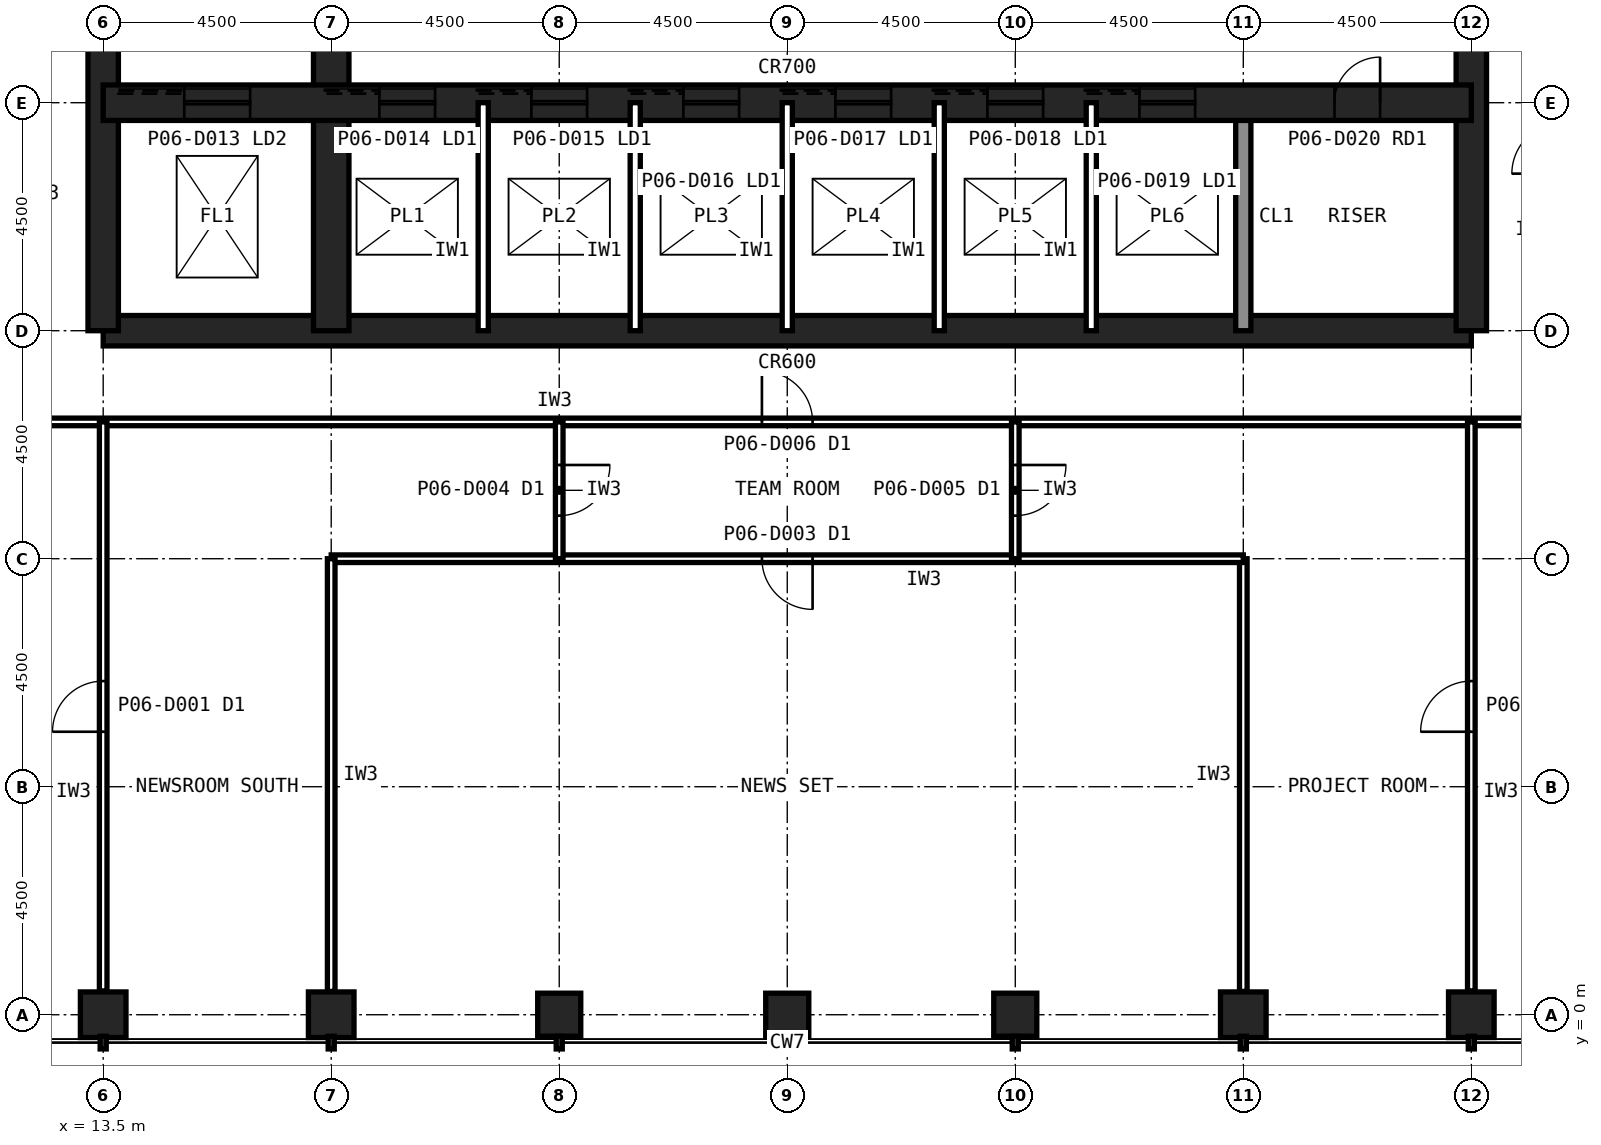
"""IFC4 building model, lengths in metres.
Left out: names, types, materials, properties, quantities, classifications, styles, units other than length and angle.
Written with IfcOpenShell. Run it as: python <this file> out.ifc"""

import sys

from ifc_helpers import new_model, si_unit, direction, frame, frame_2d, origin, origin_2d, place, context, subcontext, project, spatial, rectangle, hollow_rectangle, extrude, element, fill, save


model = new_model("IFC4")
c1 = context("Model", 3, precision=1e-05, world=origin(), true_north=direction((0.0, 1.0)))
c2 = subcontext(c1, "Body", "Model", "MODEL_VIEW")
j1 = project(units=[si_unit("LENGTHUNIT", "METRE"), si_unit("PLANEANGLEUNIT", "RADIAN")], contexts=[c1])
p1 = place(None, origin())
s1 = spatial("IfcSite", under=j1, at=p1, CompositionType="ELEMENT")
p2 = place(p1, origin())
s2 = spatial("IfcBuilding", under=s1, at=p2, CompositionType="ELEMENT")
p3 = place(p2, frame((0.0, 0.0, 29.0)))
s3 = spatial("IfcBuildingStorey", under=s2, at=p3, CompositionType="ELEMENT", Elevation=29.0)
for number, where, z_axis, x_axis in (
    (1, (13.5, 0.0, 0.0), (0.0, 0.0, 1.0), (1.0, 0.0, 0.0)),
    (2, (18.0, 0.0, 0.0), (0.0, 0.0, 1.0), (1.0, 0.0, 0.0)),
):
    element("IfcColumn", number, at=place(p3, frame(where, z_axis=z_axis, x_axis=x_axis)), inside=s3, PredefinedType="COLUMN", context=c2, shape_type="SweptSolid", body=[
        extrude(hollow_rectangle(XDim=0.9, YDim=0.9, WallThickness=0.063, at=origin_2d()), origin(), (0.0, 0.0, 1.0), 4.2),
    ])
for number, where, z_axis, x_axis in (
    (3, (22.5, 0.0, 0.0), (0.0, 0.0, 1.0), (1.0, 0.0, 0.0)),
    (4, (27.0, 0.0, 0.0), (0.0, 0.0, 1.0), (1.0, 0.0, 0.0)),
    (5, (31.5, 0.0, 0.0), (0.0, 0.0, 1.0), (1.0, 0.0, 0.0)),
):
    element("IfcColumn", number, at=place(p3, frame(where, z_axis=z_axis, x_axis=x_axis)), inside=s3, PredefinedType="COLUMN", context=c2, shape_type="SweptSolid", body=[
        extrude(hollow_rectangle(XDim=0.85, YDim=0.85, WallThickness=0.05, at=origin_2d()), origin(), (0.0, 0.0, 1.0), 4.2),
    ])
for number, where, z_axis, x_axis in (
    (6, (36.0, 0.0, 0.0), (0.0, 0.0, 1.0), (1.0, 0.0, 0.0)),
    (7, (40.5, 0.0, 0.0), (0.0, 0.0, 1.0), (1.0, 0.0, 0.0)),
):
    element("IfcColumn", number, at=place(p3, frame(where, z_axis=z_axis, x_axis=x_axis)), inside=s3, PredefinedType="COLUMN", context=c2, shape_type="SweptSolid", body=[
        extrude(hollow_rectangle(XDim=0.9, YDim=0.9, WallThickness=0.063, at=origin_2d()), origin(), (0.0, 0.0, 1.0), 4.2),
    ])
p4 = place(p3, frame((13.5, 13.5, 0.0), z_axis=(0.0, 0.0, 1.0), x_axis=(1.0, 0.0, 0.0)))
e8 = element("IfcWall", 8, at=p4, inside=s3, PredefinedType="SHEAR", context=c2, shape_type="SweptSolid", body=[
    extrude(rectangle(XDim=27.0, YDim=0.6, at=frame_2d((13.5, 0.0))), origin(), (0.0, 0.0, 1.0), 4.2),
])
p5 = place(p3, frame((40.5, 13.5, 0.0), z_axis=(0.0, 0.0, 1.0), x_axis=(0.0, 1.0, 0.0)))
e9 = element("IfcWall", 9, at=p5, inside=s3, PredefinedType="SHEAR", context=c2, shape_type="SweptSolid", body=[
    extrude(rectangle(XDim=27.0, YDim=0.6, at=frame_2d((13.5, 0.0))), origin(), (0.0, 0.0, 1.0), 4.2),
])
p6 = place(p5, frame((5.85, 0.0, 0.0)))
e10 = element("IfcOpeningElement", 10, at=p6, cuts=e9, PredefinedType="OPENING", context=c2, shape_type="SweptSolid", body=[
    extrude(rectangle(XDim=1.8, YDim=2.1, at=frame_2d((0.9, 1.05))), frame((0.0, 0.31, 0.0), z_axis=(0.0, -1.0, 0.0), x_axis=(1.0, 0.0, 0.0)), (0.0, 0.0, 1.0), 0.62),
])
p7 = place(p5, frame((19.65, 0.0, 0.0)))
e11 = element("IfcOpeningElement", 11, at=p7, cuts=e9, PredefinedType="OPENING", context=c2, shape_type="SweptSolid", body=[
    extrude(rectangle(XDim=1.2, YDim=2.1, at=frame_2d((0.6, 1.05))), frame((0.0, 0.31, 0.0), z_axis=(0.0, -1.0, 0.0), x_axis=(1.0, 0.0, 0.0)), (0.0, 0.0, 1.0), 0.62),
])
p8 = place(p3, frame((13.5, 40.5, 0.0), z_axis=(0.0, 0.0, 1.0), x_axis=(0.0, -1.0, 0.0)))
e12 = element("IfcWall", 12, at=p8, inside=s3, PredefinedType="SHEAR", context=c2, shape_type="SweptSolid", body=[
    extrude(rectangle(XDim=27.0, YDim=0.6, at=frame_2d((13.5, 0.0))), origin(), (0.0, 0.0, 1.0), 4.2),
])
p9 = place(p8, frame((19.65, 0.0, 0.0)))
e13 = element("IfcOpeningElement", 13, at=p9, cuts=e12, PredefinedType="OPENING", context=c2, shape_type="SweptSolid", body=[
    extrude(rectangle(XDim=1.2, YDim=2.1, at=frame_2d((0.6, 1.05))), frame((0.0, 0.31, 0.0), z_axis=(0.0, -1.0, 0.0), x_axis=(1.0, 0.0, 0.0)), (0.0, 0.0, 1.0), 0.62),
])
p10 = place(p8, frame((5.85, 0.0, 0.0)))
e14 = element("IfcOpeningElement", 14, at=p10, cuts=e12, PredefinedType="OPENING", context=c2, shape_type="SweptSolid", body=[
    extrude(rectangle(XDim=1.8, YDim=2.1, at=frame_2d((0.9, 1.05))), frame((0.0, 0.31, 0.0), z_axis=(0.0, -1.0, 0.0), x_axis=(1.0, 0.0, 0.0)), (0.0, 0.0, 1.0), 0.62),
])
p11 = place(p3, frame((18.0, 13.5, 0.0), z_axis=(0.0, 0.0, 1.0), x_axis=(0.0, 1.0, 0.0)))
e15 = element("IfcWall", 15, at=p11, inside=s3, PredefinedType="SHEAR", context=c2, shape_type="SweptSolid", body=[
    extrude(rectangle(XDim=18.0, YDim=0.7, at=frame_2d((9.0, 0.0))), origin(), (0.0, 0.0, 1.0), 4.2),
])
p12 = place(p3, frame((36.0, 13.5, 0.0), z_axis=(0.0, 0.0, 1.0), x_axis=(0.0, 1.0, 0.0)))
e16 = element("IfcWall", 16, at=p12, inside=s3, PredefinedType="SOLIDWALL", context=c2, shape_type="SweptSolid", body=[
    extrude(rectangle(XDim=4.5, YDim=0.3, at=frame_2d((2.25, 0.0))), origin(), (0.0, 0.0, 1.0), 4.04),
])
p13 = place(p3, frame((13.5, 18.0, 0.0), z_axis=(0.0, 0.0, 1.0), x_axis=(1.0, 0.0, 0.0)))
e17 = element("IfcWall", 17, at=p13, inside=s3, PredefinedType="SHEAR", context=c2, shape_type="SweptSolid", body=[
    extrude(rectangle(XDim=27.0, YDim=0.7, at=frame_2d((13.5, 0.0))), origin(), (0.0, 0.0, 1.0), 4.2),
])
p14 = place(p13, frame((24.3, 0.0, 0.0)))
e18 = element("IfcOpeningElement", 18, at=p14, cuts=e17, PredefinedType="OPENING", context=c2, shape_type="SweptSolid", body=[
    extrude(rectangle(XDim=0.9, YDim=2.1, at=frame_2d((0.45, 1.05))), frame((0.0, 0.36, 0.0), z_axis=(0.0, -1.0, 0.0), x_axis=(1.0, 0.0, 0.0)), (0.0, 0.0, 1.0), 0.72),
])
p15 = place(p13, frame((5.45, 0.0, 0.0)))
e19 = element("IfcOpeningElement", 19, at=p15, cuts=e17, PredefinedType="OPENING", context=c2, shape_type="SweptSolid", body=[
    extrude(rectangle(XDim=1.1, YDim=2.1, at=frame_2d((0.55, 1.05))), frame((0.0, 0.36, 0.0), z_axis=(0.0, -1.0, 0.0), x_axis=(1.0, 0.0, 0.0)), (0.0, 0.0, 1.0), 0.72),
])
p16 = place(p13, frame((8.45, 0.0, 0.0)))
e20 = element("IfcOpeningElement", 20, at=p16, cuts=e17, PredefinedType="OPENING", context=c2, shape_type="SweptSolid", body=[
    extrude(rectangle(XDim=1.1, YDim=2.1, at=frame_2d((0.55, 1.05))), frame((0.0, 0.36, 0.0), z_axis=(0.0, -1.0, 0.0), x_axis=(1.0, 0.0, 0.0)), (0.0, 0.0, 1.0), 0.72),
])
p17 = place(p13, frame((11.45, 0.0, 0.0)))
e21 = element("IfcOpeningElement", 21, at=p17, cuts=e17, PredefinedType="OPENING", context=c2, shape_type="SweptSolid", body=[
    extrude(rectangle(XDim=1.1, YDim=2.1, at=frame_2d((0.55, 1.05))), frame((0.0, 0.36, 0.0), z_axis=(0.0, -1.0, 0.0), x_axis=(1.0, 0.0, 0.0)), (0.0, 0.0, 1.0), 0.72),
])
p18 = place(p13, frame((14.45, 0.0, 0.0)))
e22 = element("IfcOpeningElement", 22, at=p18, cuts=e17, PredefinedType="OPENING", context=c2, shape_type="SweptSolid", body=[
    extrude(rectangle(XDim=1.1, YDim=2.1, at=frame_2d((0.55, 1.05))), frame((0.0, 0.36, 0.0), z_axis=(0.0, -1.0, 0.0), x_axis=(1.0, 0.0, 0.0)), (0.0, 0.0, 1.0), 0.72),
])
p19 = place(p13, frame((17.45, 0.0, 0.0)))
e23 = element("IfcOpeningElement", 23, at=p19, cuts=e17, PredefinedType="OPENING", context=c2, shape_type="SweptSolid", body=[
    extrude(rectangle(XDim=1.1, YDim=2.1, at=frame_2d((0.55, 1.05))), frame((0.0, 0.36, 0.0), z_axis=(0.0, -1.0, 0.0), x_axis=(1.0, 0.0, 0.0)), (0.0, 0.0, 1.0), 0.72),
])
p20 = place(p13, frame((20.45, 0.0, 0.0)))
e24 = element("IfcOpeningElement", 24, at=p20, cuts=e17, PredefinedType="OPENING", context=c2, shape_type="SweptSolid", body=[
    extrude(rectangle(XDim=1.1, YDim=2.1, at=frame_2d((0.55, 1.05))), frame((0.0, 0.36, 0.0), z_axis=(0.0, -1.0, 0.0), x_axis=(1.0, 0.0, 0.0)), (0.0, 0.0, 1.0), 0.72),
])
p21 = place(p13, frame((1.6, 0.0, 0.0)))
e25 = element("IfcOpeningElement", 25, at=p21, cuts=e17, PredefinedType="OPENING", context=c2, shape_type="SweptSolid", body=[
    extrude(rectangle(XDim=1.3, YDim=2.2, at=frame_2d((0.65, 1.1))), frame((0.0, 0.36, 0.0), z_axis=(0.0, -1.0, 0.0), x_axis=(1.0, 0.0, 0.0)), (0.0, 0.0, 1.0), 0.72),
])
for number, where, z_axis, x_axis in (
    (26, (21.0, 13.5, 0.0), (0.0, 0.0, 1.0), (0.0, 1.0, 0.0)),
    (27, (24.0, 13.5, 0.0), (0.0, 0.0, 1.0), (0.0, 1.0, 0.0)),
    (28, (27.0, 13.5, 0.0), (0.0, 0.0, 1.0), (0.0, 1.0, 0.0)),
    (29, (30.0, 13.5, 0.0), (0.0, 0.0, 1.0), (0.0, 1.0, 0.0)),
    (30, (33.0, 13.5, 0.0), (0.0, 0.0, 1.0), (0.0, 1.0, 0.0)),
):
    element("IfcWall", number, at=place(p3, frame(where, z_axis=z_axis, x_axis=x_axis)), inside=s3, PredefinedType="PARTITIONING", context=c2, shape_type="SweptSolid", body=[
        extrude(rectangle(XDim=4.5, YDim=0.2, at=frame_2d((2.25, 0.0))), origin(), (0.0, 0.0, 1.0), 4.04),
    ])
p22 = place(p3, frame((11.7, 11.7, 0.0), z_axis=(0.0, 0.0, 1.0), x_axis=(1.0, 0.0, 0.0)))
e31 = element("IfcWall", 31, at=p22, inside=s3, PredefinedType="PARTITIONING", context=c2, shape_type="SweptSolid", body=[
    extrude(rectangle(XDim=30.6, YDim=0.15, at=frame_2d((15.3, 0.0))), origin(), (0.0, 0.0, 1.0), 4.04),
])
p23 = place(p22, frame((14.8, 0.0, 0.0)))
e32 = element("IfcOpeningElement", 32, at=p23, cuts=e31, PredefinedType="OPENING", context=c2, shape_type="SweptSolid", body=[
    extrude(rectangle(XDim=1.0, YDim=2.1, at=frame_2d((0.5, 1.05))), frame((0.0, 0.085, 0.0), z_axis=(0.0, -1.0, 0.0), x_axis=(1.0, 0.0, 0.0)), (0.0, 0.0, 1.0), 0.17),
])
p24 = place(p3, frame((36.0, 0.46, 0.0), z_axis=(0.0, 0.0, 1.0), x_axis=(0.0, 1.0, 0.0)))
e33 = element("IfcWall", 33, at=p24, inside=s3, PredefinedType="PARTITIONING", context=c2, shape_type="SweptSolid", body=[
    extrude(rectangle(XDim=8.54, YDim=0.15, at=frame_2d((4.27, 0.0))), origin(), (0.0, 0.0, 1.0), 3.189),
])
p25 = place(p3, frame((36.0, 9.0, 0.0), z_axis=(0.0, 0.0, 1.0), x_axis=(-1.0, 0.0, 0.0)))
e34 = element("IfcWall", 34, at=p25, inside=s3, PredefinedType="PARTITIONING", context=c2, shape_type="SweptSolid", body=[
    extrude(rectangle(XDim=18.0, YDim=0.15, at=frame_2d((9.0, 0.0))), origin(), (0.0, 0.0, 1.0), 4.04),
])
p26 = place(p25, frame((8.5, 0.0, 0.0)))
e35 = element("IfcOpeningElement", 35, at=p26, cuts=e34, PredefinedType="OPENING", context=c2, shape_type="SweptSolid", body=[
    extrude(rectangle(XDim=1.0, YDim=2.1, at=frame_2d((0.5, 1.05))), frame((0.0, 0.085, 0.0), z_axis=(0.0, -1.0, 0.0), x_axis=(1.0, 0.0, 0.0)), (0.0, 0.0, 1.0), 0.17),
])
p27 = place(p3, frame((18.0, 9.0, 0.0), z_axis=(0.0, 0.0, 1.0), x_axis=(0.0, -1.0, 0.0)))
e36 = element("IfcWall", 36, at=p27, inside=s3, PredefinedType="PARTITIONING", context=c2, shape_type="SweptSolid", body=[
    extrude(rectangle(XDim=8.54, YDim=0.15, at=frame_2d((4.27, 0.0))), origin(), (0.0, 0.0, 1.0), 3.189),
])
p28 = place(p3, frame((40.5, 0.47, 0.0), z_axis=(0.0, 0.0, 1.0), x_axis=(0.0, 1.0, 0.0)))
e37 = element("IfcWall", 37, at=p28, inside=s3, PredefinedType="PARTITIONING", context=c2, shape_type="SweptSolid", body=[
    extrude(rectangle(XDim=11.23, YDim=0.15, at=frame_2d((5.615, 0.0))), origin(), (0.0, 0.0, 1.0), 3.189),
])
p29 = place(p28, frame((5.115, 0.0, 0.0)))
e38 = element("IfcOpeningElement", 38, at=p29, cuts=e37, PredefinedType="OPENING", context=c2, shape_type="SweptSolid", body=[
    extrude(rectangle(XDim=1.0, YDim=2.1, at=frame_2d((0.5, 1.05))), frame((0.0, 0.085, 0.0), z_axis=(0.0, -1.0, 0.0), x_axis=(1.0, 0.0, 0.0)), (0.0, 0.0, 1.0), 0.17),
])
p30 = place(p3, frame((13.5, 0.47, 0.0), z_axis=(0.0, 0.0, 1.0), x_axis=(0.0, 1.0, 0.0)))
e39 = element("IfcWall", 39, at=p30, inside=s3, PredefinedType="PARTITIONING", context=c2, shape_type="SweptSolid", body=[
    extrude(rectangle(XDim=11.23, YDim=0.15, at=frame_2d((5.615, 0.0))), origin(), (0.0, 0.0, 1.0), 3.189),
])
p31 = place(p30, frame((5.115, 0.0, 0.0)))
e40 = element("IfcOpeningElement", 40, at=p31, cuts=e39, PredefinedType="OPENING", context=c2, shape_type="SweptSolid", body=[
    extrude(rectangle(XDim=1.0, YDim=2.1, at=frame_2d((0.5, 1.05))), frame((0.0, 0.085, 0.0), z_axis=(0.0, -1.0, 0.0), x_axis=(1.0, 0.0, 0.0)), (0.0, 0.0, 1.0), 0.17),
])
p32 = place(p3, frame((22.5, 11.7, 0.0), z_axis=(0.0, 0.0, 1.0), x_axis=(0.0, -1.0, 0.0)))
e41 = element("IfcWall", 41, at=p32, inside=s3, PredefinedType="PARTITIONING", context=c2, shape_type="SweptSolid", body=[
    extrude(rectangle(XDim=2.7, YDim=0.15, at=frame_2d((1.35, 0.0))), origin(), (0.0, 0.0, 1.0), 3.189),
])
p33 = place(p32, frame((0.85, 0.0, 0.0)))
e42 = element("IfcOpeningElement", 42, at=p33, cuts=e41, PredefinedType="OPENING", context=c2, shape_type="SweptSolid", body=[
    extrude(rectangle(XDim=1.0, YDim=2.1, at=frame_2d((0.5, 1.05))), frame((0.0, 0.085, 0.0), z_axis=(0.0, -1.0, 0.0), x_axis=(1.0, 0.0, 0.0)), (0.0, 0.0, 1.0), 0.17),
])
p34 = place(p3, frame((31.5, 11.7, 0.0), z_axis=(0.0, 0.0, 1.0), x_axis=(0.0, -1.0, 0.0)))
e43 = element("IfcWall", 43, at=p34, inside=s3, PredefinedType="PARTITIONING", context=c2, shape_type="SweptSolid", body=[
    extrude(rectangle(XDim=2.7, YDim=0.15, at=frame_2d((1.35, 0.0))), origin(), (0.0, 0.0, 1.0), 3.189),
])
p35 = place(p34, frame((0.85, 0.0, 0.0)))
e44 = element("IfcOpeningElement", 44, at=p35, cuts=e43, PredefinedType="OPENING", context=c2, shape_type="SweptSolid", body=[
    extrude(rectangle(XDim=1.0, YDim=2.1, at=frame_2d((0.5, 1.05))), frame((0.0, 0.085, 0.0), z_axis=(0.0, -1.0, 0.0), x_axis=(1.0, 0.0, 0.0)), (0.0, 0.0, 1.0), 0.17),
])
p36 = place(p14, origin())
e45 = element("IfcDoor", 45, at=p36, inside=s3, OperationType="SINGLE_SWING_RIGHT", PredefinedType="DOOR", context=c2, shape_type="SweptSolid", body=[
    extrude(rectangle(XDim=0.9, YDim=2.1, at=frame_2d((0.45, 1.05))), frame((0.0, 0.025, 0.0), z_axis=(0.0, -1.0, 0.0), x_axis=(1.0, 0.0, 0.0)), (0.0, 0.0, 1.0), 0.05),
])
fill(e18, e45)
p37 = place(p15, origin())
e46 = element("IfcDoor", 46, at=p37, inside=s3, OperationType="SLIDING_TO_LEFT", PredefinedType="DOOR", context=c2, shape_type="SweptSolid", body=[
    extrude(rectangle(XDim=1.1, YDim=2.1, at=frame_2d((0.55, 1.05))), frame((0.0, 0.025, 0.0), z_axis=(0.0, -1.0, 0.0), x_axis=(1.0, 0.0, 0.0)), (0.0, 0.0, 1.0), 0.05),
])
fill(e19, e46)
p38 = place(p16, origin())
e47 = element("IfcDoor", 47, at=p38, inside=s3, OperationType="SLIDING_TO_LEFT", PredefinedType="DOOR", context=c2, shape_type="SweptSolid", body=[
    extrude(rectangle(XDim=1.1, YDim=2.1, at=frame_2d((0.55, 1.05))), frame((0.0, 0.025, 0.0), z_axis=(0.0, -1.0, 0.0), x_axis=(1.0, 0.0, 0.0)), (0.0, 0.0, 1.0), 0.05),
])
fill(e20, e47)
p39 = place(p17, origin())
e48 = element("IfcDoor", 48, at=p39, inside=s3, OperationType="SLIDING_TO_LEFT", PredefinedType="DOOR", context=c2, shape_type="SweptSolid", body=[
    extrude(rectangle(XDim=1.1, YDim=2.1, at=frame_2d((0.55, 1.05))), frame((0.0, 0.025, 0.0), z_axis=(0.0, -1.0, 0.0), x_axis=(1.0, 0.0, 0.0)), (0.0, 0.0, 1.0), 0.05),
])
fill(e21, e48)
p40 = place(p18, origin())
e49 = element("IfcDoor", 49, at=p40, inside=s3, OperationType="SLIDING_TO_LEFT", PredefinedType="DOOR", context=c2, shape_type="SweptSolid", body=[
    extrude(rectangle(XDim=1.1, YDim=2.1, at=frame_2d((0.55, 1.05))), frame((0.0, 0.025, 0.0), z_axis=(0.0, -1.0, 0.0), x_axis=(1.0, 0.0, 0.0)), (0.0, 0.0, 1.0), 0.05),
])
fill(e22, e49)
p41 = place(p19, origin())
e50 = element("IfcDoor", 50, at=p41, inside=s3, OperationType="SLIDING_TO_LEFT", PredefinedType="DOOR", context=c2, shape_type="SweptSolid", body=[
    extrude(rectangle(XDim=1.1, YDim=2.1, at=frame_2d((0.55, 1.05))), frame((0.0, 0.025, 0.0), z_axis=(0.0, -1.0, 0.0), x_axis=(1.0, 0.0, 0.0)), (0.0, 0.0, 1.0), 0.05),
])
fill(e23, e50)
p42 = place(p20, origin())
e51 = element("IfcDoor", 51, at=p42, inside=s3, OperationType="SLIDING_TO_LEFT", PredefinedType="DOOR", context=c2, shape_type="SweptSolid", body=[
    extrude(rectangle(XDim=1.1, YDim=2.1, at=frame_2d((0.55, 1.05))), frame((0.0, 0.025, 0.0), z_axis=(0.0, -1.0, 0.0), x_axis=(1.0, 0.0, 0.0)), (0.0, 0.0, 1.0), 0.05),
])
fill(e24, e51)
p43 = place(p21, origin())
e52 = element("IfcDoor", 52, at=p43, inside=s3, OperationType="SLIDING_TO_LEFT", PredefinedType="DOOR", context=c2, shape_type="SweptSolid", body=[
    extrude(rectangle(XDim=1.3, YDim=2.2, at=frame_2d((0.65, 1.1))), frame((0.0, 0.025, 0.0), z_axis=(0.0, -1.0, 0.0), x_axis=(1.0, 0.0, 0.0)), (0.0, 0.0, 1.0), 0.05),
])
fill(e25, e52)
p44 = place(p23, origin())
e53 = element("IfcDoor", 53, at=p44, inside=s3, OperationType="SINGLE_SWING_LEFT", PredefinedType="DOOR", context=c2, shape_type="SweptSolid", body=[
    extrude(rectangle(XDim=1.0, YDim=2.1, at=frame_2d((0.5, 1.05))), frame((0.0, 0.025, 0.0), z_axis=(0.0, -1.0, 0.0), x_axis=(1.0, 0.0, 0.0)), (0.0, 0.0, 1.0), 0.05),
])
fill(e32, e53)
p45 = place(p26, origin())
e54 = element("IfcDoor", 54, at=p45, inside=s3, OperationType="SINGLE_SWING_LEFT", PredefinedType="DOOR", context=c2, shape_type="SweptSolid", body=[
    extrude(rectangle(XDim=1.0, YDim=2.1, at=frame_2d((0.5, 1.05))), frame((0.0, 0.025, 0.0), z_axis=(0.0, -1.0, 0.0), x_axis=(1.0, 0.0, 0.0)), (0.0, 0.0, 1.0), 0.05),
])
fill(e35, e54)
p46 = place(p29, origin())
e55 = element("IfcDoor", 55, at=p46, inside=s3, OperationType="SINGLE_SWING_LEFT", PredefinedType="DOOR", context=c2, shape_type="SweptSolid", body=[
    extrude(rectangle(XDim=1.0, YDim=2.1, at=frame_2d((0.5, 1.05))), frame((0.0, 0.025, 0.0), z_axis=(0.0, -1.0, 0.0), x_axis=(1.0, 0.0, 0.0)), (0.0, 0.0, 1.0), 0.05),
])
fill(e38, e55)
p47 = place(p31, origin())
e56 = element("IfcDoor", 56, at=p47, inside=s3, OperationType="SINGLE_SWING_LEFT", PredefinedType="DOOR", context=c2, shape_type="SweptSolid", body=[
    extrude(rectangle(XDim=1.0, YDim=2.1, at=frame_2d((0.5, 1.05))), frame((0.0, 0.025, 0.0), z_axis=(0.0, -1.0, 0.0), x_axis=(1.0, 0.0, 0.0)), (0.0, 0.0, 1.0), 0.05),
])
fill(e40, e56)
p48 = place(p33, origin())
e57 = element("IfcDoor", 57, at=p48, inside=s3, OperationType="SINGLE_SWING_LEFT", PredefinedType="DOOR", context=c2, shape_type="SweptSolid", body=[
    extrude(rectangle(XDim=1.0, YDim=2.1, at=frame_2d((0.5, 1.05))), frame((0.0, 0.025, 0.0), z_axis=(0.0, -1.0, 0.0), x_axis=(1.0, 0.0, 0.0)), (0.0, 0.0, 1.0), 0.05),
])
fill(e42, e57)
p49 = place(p35, origin())
e58 = element("IfcDoor", 58, at=p49, inside=s3, OperationType="SINGLE_SWING_LEFT", PredefinedType="DOOR", context=c2, shape_type="SweptSolid", body=[
    extrude(rectangle(XDim=1.0, YDim=2.1, at=frame_2d((0.5, 1.05))), frame((0.0, 0.025, 0.0), z_axis=(0.0, -1.0, 0.0), x_axis=(1.0, 0.0, 0.0)), (0.0, 0.0, 1.0), 0.05),
])
fill(e44, e58)
save(model, sys.argv[1])
